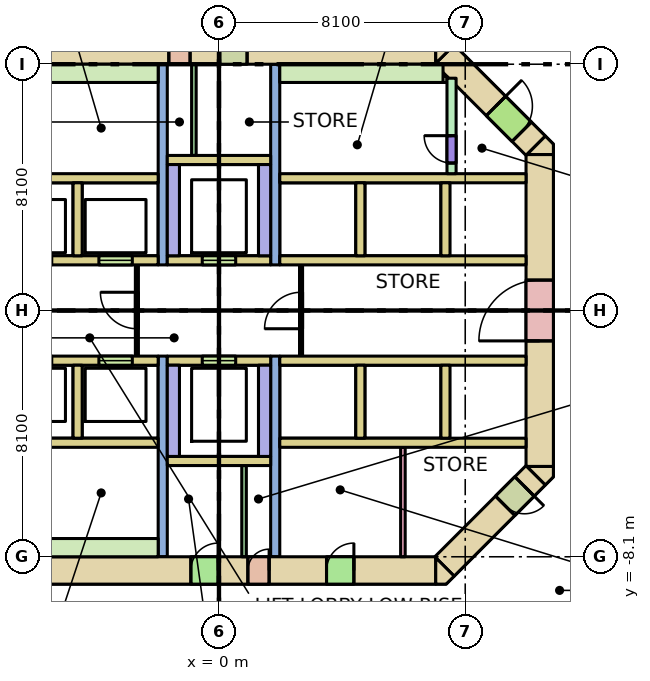
"""IFC4 building model, lengths in metres.
Left out: names, types, materials, properties, quantities, classifications, styles, units other than length and angle.
Written with IfcOpenShell. Run it as: python <this file> out.ifc"""

import sys

from ifc_helpers import new_model, si_unit, direction, frame, frame_2d, origin, place, context, subcontext, project, spatial, polyline, rectangle, outline, extrude, element, fill, save


model = new_model("IFC4")
c1 = context("Model", 3, precision=1e-05, world=origin(), true_north=direction((0.0, 1.0)))
c2 = subcontext(c1, "Body", "Model", "MODEL_VIEW")
j1 = project(units=[si_unit("LENGTHUNIT", "METRE"), si_unit("PLANEANGLEUNIT", "RADIAN")], contexts=[c1])
p1 = place(None, origin())
s1 = spatial("IfcSite", under=j1, at=p1, CompositionType="ELEMENT")
p2 = place(p1, origin())
s2 = spatial("IfcBuilding", under=s1, at=p2, CompositionType="ELEMENT")
p3 = place(p2, frame((0.0, 0.0, -7.2)))
s3 = spatial("IfcBuildingStorey", under=s2, at=p3, CompositionType="ELEMENT", Elevation=-7.2)
p4 = place(p3, frame((-7.13, 8.55, -0.32), z_axis=(0.0, 0.0, 1.0), x_axis=(1.0, 0.0, 0.0)))
e1 = element("IfcWall", 1, at=p4, inside=s3, PredefinedType="SHEAR", context=c2, shape_type="SweptSolid", body=[
    extrude(rectangle(XDim=14.26, YDim=0.9, at=frame_2d((7.13, 0.0))), origin(), (0.0, 0.0, 1.0), 3.6),
])
p5 = place(p4, frame((5.48, 0.0, 0.32)))
e2 = element("IfcOpeningElement", 2, at=p5, cuts=e1, PredefinedType="OPENING", context=c2, shape_type="SweptSolid", body=[
    extrude(rectangle(XDim=0.7, YDim=2.1, at=frame_2d((0.35, 1.05))), frame((0.0, 0.46, 0.0), z_axis=(0.0, -1.0, 0.0), x_axis=(1.0, 0.0, 0.0)), (0.0, 0.0, 1.0), 0.92),
])
p6 = place(p4, frame((7.155, 0.0, 0.32)))
e3 = element("IfcOpeningElement", 3, at=p6, cuts=e1, PredefinedType="OPENING", context=c2, shape_type="SweptSolid", body=[
    extrude(rectangle(XDim=0.9, YDim=2.1, at=frame_2d((0.45, 1.05))), frame((0.0, 0.46, 0.0), z_axis=(0.0, -1.0, 0.0), x_axis=(1.0, 0.0, 0.0)), (0.0, 0.0, 1.0), 0.92),
])
p7 = place(p3, frame((-7.13, -8.55, -0.32), z_axis=(0.0, 0.0, 1.0), x_axis=(1.0, 0.0, 0.0)))
e4 = element("IfcWall", 4, at=p7, inside=s3, PredefinedType="SHEAR", context=c2, shape_type="SweptSolid", body=[
    extrude(rectangle(XDim=14.26, YDim=0.9, at=frame_2d((7.13, 0.0))), origin(), (0.0, 0.0, 1.0), 3.6),
])
p8 = place(p7, frame((8.08, 0.0, 0.32)))
e5 = element("IfcOpeningElement", 5, at=p8, cuts=e4, PredefinedType="OPENING", context=c2, shape_type="SweptSolid", body=[
    extrude(rectangle(XDim=0.7, YDim=2.1, at=frame_2d((0.35, 1.05))), frame((0.0, 0.46, 0.0), z_axis=(0.0, -1.0, 0.0), x_axis=(1.0, 0.0, 0.0)), (0.0, 0.0, 1.0), 0.92),
])
p9 = place(p7, frame((6.205, 0.0, 0.32)))
e6 = element("IfcOpeningElement", 6, at=p9, cuts=e4, PredefinedType="OPENING", context=c2, shape_type="SweptSolid", body=[
    extrude(rectangle(XDim=0.9, YDim=2.1, at=frame_2d((0.45, 1.05))), frame((0.0, 0.46, 0.0), z_axis=(0.0, -1.0, 0.0), x_axis=(1.0, 0.0, 0.0)), (0.0, 0.0, 1.0), 0.92),
])
p10 = place(p7, frame((10.667, 0.0, 0.32)))
e7 = element("IfcOpeningElement", 7, at=p10, cuts=e4, PredefinedType="OPENING", context=c2, shape_type="SweptSolid", body=[
    extrude(rectangle(XDim=0.9, YDim=2.1, at=frame_2d((0.45, 1.05))), frame((0.0, 0.46, 0.0), z_axis=(0.0, -1.0, 0.0), x_axis=(1.0, 0.0, 0.0)), (0.0, 0.0, 1.0), 0.92),
])
p11 = place(p3, frame((10.55, -5.13, -0.32), z_axis=(0.0, 0.0, 1.0), x_axis=(0.0, 1.0, 0.0)))
e8 = element("IfcWall", 8, at=p11, inside=s3, PredefinedType="SHEAR", context=c2, shape_type="SweptSolid", body=[
    extrude(rectangle(XDim=10.26, YDim=0.9, at=frame_2d((5.13, 0.0))), origin(), (0.0, 0.0, 1.0), 3.6),
])
p12 = place(p11, frame((4.13, 0.0, 0.32)))
e9 = element("IfcOpeningElement", 9, at=p12, cuts=e8, PredefinedType="OPENING", context=c2, shape_type="SweptSolid", body=[
    extrude(rectangle(XDim=2.0, YDim=2.1, at=frame_2d((1.0, 1.05))), frame((0.0, 0.46, 0.0), z_axis=(0.0, -1.0, 0.0), x_axis=(1.0, 0.0, 0.0)), (0.0, 0.0, 1.0), 0.92),
])
p13 = place(p3, frame((7.418, 8.418, -0.32), z_axis=(0.0, 0.0, 1.0), x_axis=(0.707106781187, -0.707106781187, 0.0)))
e10 = element("IfcWall", 10, at=p13, inside=s3, PredefinedType="SHEAR", context=c2, shape_type="SweptSolid", body=[
    extrude(rectangle(XDim=4.243, YDim=0.9, at=frame_2d((2.121, 0.0))), origin(), (0.0, 0.0, 1.0), 3.6),
])
p14 = place(p13, frame((2.393, 0.0, 0.32)))
e11 = element("IfcOpeningElement", 11, at=p14, cuts=e10, PredefinedType="OPENING", context=c2, shape_type="SweptSolid", body=[
    extrude(rectangle(XDim=1.2, YDim=2.1, at=frame_2d((0.6, 1.05))), frame((0.0, 0.46, 0.0), z_axis=(0.0, -1.0, 0.0), x_axis=(1.0, 0.0, 0.0)), (0.0, 0.0, 1.0), 0.92),
])
p15 = place(p3, frame((10.418, -5.418, -0.32), z_axis=(0.0, 0.0, 1.0), x_axis=(-0.707106781187, -0.707106781187, 0.0)))
e12 = element("IfcWall", 12, at=p15, inside=s3, PredefinedType="SHEAR", context=c2, shape_type="SweptSolid", body=[
    extrude(rectangle(XDim=4.243, YDim=0.9, at=frame_2d((2.121, 0.0))), origin(), (0.0, 0.0, 1.0), 3.6),
])
p16 = place(p15, frame((0.52, 0.0, 0.32)))
e13 = element("IfcOpeningElement", 13, at=p16, cuts=e12, PredefinedType="OPENING", context=c2, shape_type="SweptSolid", body=[
    extrude(rectangle(XDim=0.9, YDim=2.1, at=frame_2d((0.45, 1.05))), frame((0.0, 0.46, 0.0), z_axis=(0.0, -1.0, 0.0), x_axis=(1.0, 0.0, 0.0)), (0.0, 0.0, 1.0), 0.92),
])
p17 = place(p3, frame((0.0, 0.0, -0.32)))
e14 = element("IfcWall", 14, at=p17, inside=s3, PredefinedType="SHEAR", context=c2, shape_type="SweptSolid", body=[
    extrude(outline(polyline([(7.473, -9.0), (7.13, -9.0), (7.13, -8.13), (7.736, -8.736), (7.473, -9.0)])), origin(), (0.0, 0.0, 1.0), 3.6),
])
p18 = place(p3, frame((0.0, 0.0, -0.32)))
e15 = element("IfcWall", 15, at=p18, inside=s3, PredefinedType="SHEAR", context=c2, shape_type="SweptSolid", body=[
    extrude(outline(polyline([(11.0, -5.473), (10.736, -5.736), (10.13, -5.13), (11.0, -5.13), (11.0, -5.473)])), origin(), (0.0, 0.0, 1.0), 3.6),
])
p19 = place(p3, frame((0.0, 0.0, -0.32)))
e16 = element("IfcWall", 16, at=p19, inside=s3, PredefinedType="SHEAR", context=c2, shape_type="SweptSolid", body=[
    extrude(outline(polyline([(11.0, 5.473), (11.0, 5.13), (10.13, 5.13), (10.736, 5.736), (11.0, 5.473)])), origin(), (0.0, 0.0, 1.0), 3.6),
])
p20 = place(p3, frame((0.0, 0.0, -0.32)))
e17 = element("IfcWall", 17, at=p20, inside=s3, PredefinedType="SHEAR", context=c2, shape_type="SweptSolid", body=[
    extrude(outline(polyline([(7.473, 9.0), (7.736, 8.736), (7.13, 8.13), (7.13, 9.0), (7.473, 9.0)])), origin(), (0.0, 0.0, 1.0), 3.6),
])
for number, where, z_axis, x_axis in (
    (18, (-10.1, 4.35, 0.0), (0.0, 0.0, 1.0), (1.0, 0.0, 0.0)),
    (19, (-10.1, -4.35, 0.0), (0.0, 0.0, 1.0), (1.0, 0.0, 0.0)),
    (20, (2.0, 4.35, 0.0), (0.0, 0.0, 1.0), (1.0, 0.0, 0.0)),
    (21, (2.0, -4.35, 0.0), (0.0, 0.0, 1.0), (1.0, 0.0, 0.0)),
):
    element("IfcWall", number, at=place(p3, frame(where, z_axis=z_axis, x_axis=x_axis)), inside=s3, PredefinedType="SOLIDWALL", context=c2, shape_type="SweptSolid", body=[
        extrude(rectangle(XDim=8.1, YDim=0.3, at=frame_2d((4.05, 0.0))), origin(), (0.0, 0.0, 1.0), 3.28),
    ])
p21 = place(p3, frame((-10.1, 1.65, 0.0), z_axis=(0.0, 0.0, 1.0), x_axis=(1.0, 0.0, 0.0)))
e22 = element("IfcWall", 22, at=p21, inside=s3, PredefinedType="SOLIDWALL", context=c2, shape_type="SweptSolid", body=[
    extrude(rectangle(XDim=8.1, YDim=0.3, at=frame_2d((4.05, 0.0))), origin(), (0.0, 0.0, 1.0), 3.28),
])
p22 = place(p21, frame((0.7, 0.0, 0.0)))
e23 = element("IfcOpeningElement", 23, at=p22, cuts=e22, PredefinedType="OPENING", context=c2, shape_type="SweptSolid", body=[
    extrude(rectangle(XDim=1.1, YDim=2.1, at=frame_2d((0.55, 1.05))), frame((0.0, 0.16, 0.0), z_axis=(0.0, -1.0, 0.0), x_axis=(1.0, 0.0, 0.0)), (0.0, 0.0, 1.0), 0.32),
])
p23 = place(p21, frame((3.5, 0.0, 0.0)))
e24 = element("IfcOpeningElement", 24, at=p23, cuts=e22, PredefinedType="OPENING", context=c2, shape_type="SweptSolid", body=[
    extrude(rectangle(XDim=1.1, YDim=2.1, at=frame_2d((0.55, 1.05))), frame((0.0, 0.16, 0.0), z_axis=(0.0, -1.0, 0.0), x_axis=(1.0, 0.0, 0.0)), (0.0, 0.0, 1.0), 0.32),
])
p24 = place(p21, frame((6.15, 0.0, 0.0)))
e25 = element("IfcOpeningElement", 25, at=p24, cuts=e22, PredefinedType="OPENING", context=c2, shape_type="SweptSolid", body=[
    extrude(rectangle(XDim=1.1, YDim=2.1, at=frame_2d((0.55, 1.05))), frame((0.0, 0.16, 0.0), z_axis=(0.0, -1.0, 0.0), x_axis=(1.0, 0.0, 0.0)), (0.0, 0.0, 1.0), 0.32),
])
p25 = place(p3, frame((-10.1, -1.65, 0.0), z_axis=(0.0, 0.0, 1.0), x_axis=(1.0, 0.0, 0.0)))
e26 = element("IfcWall", 26, at=p25, inside=s3, PredefinedType="SOLIDWALL", context=c2, shape_type="SweptSolid", body=[
    extrude(rectangle(XDim=8.1, YDim=0.3, at=frame_2d((4.05, 0.0))), origin(), (0.0, 0.0, 1.0), 3.28),
])
p26 = place(p25, frame((0.7, 0.0, 0.0)))
e27 = element("IfcOpeningElement", 27, at=p26, cuts=e26, PredefinedType="OPENING", context=c2, shape_type="SweptSolid", body=[
    extrude(rectangle(XDim=1.1, YDim=2.1, at=frame_2d((0.55, 1.05))), frame((0.0, 0.16, 0.0), z_axis=(0.0, -1.0, 0.0), x_axis=(1.0, 0.0, 0.0)), (0.0, 0.0, 1.0), 0.32),
])
p27 = place(p25, frame((3.5, 0.0, 0.0)))
e28 = element("IfcOpeningElement", 28, at=p27, cuts=e26, PredefinedType="OPENING", context=c2, shape_type="SweptSolid", body=[
    extrude(rectangle(XDim=1.1, YDim=2.1, at=frame_2d((0.55, 1.05))), frame((0.0, 0.16, 0.0), z_axis=(0.0, -1.0, 0.0), x_axis=(1.0, 0.0, 0.0)), (0.0, 0.0, 1.0), 0.32),
])
p28 = place(p25, frame((6.15, 0.0, 0.0)))
e29 = element("IfcOpeningElement", 29, at=p28, cuts=e26, PredefinedType="OPENING", context=c2, shape_type="SweptSolid", body=[
    extrude(rectangle(XDim=1.1, YDim=2.1, at=frame_2d((0.55, 1.05))), frame((0.0, 0.16, 0.0), z_axis=(0.0, -1.0, 0.0), x_axis=(1.0, 0.0, 0.0)), (0.0, 0.0, 1.0), 0.32),
])
for number, where, z_axis, x_axis in (
    (30, (2.0, 1.65, 0.0), (0.0, 0.0, 1.0), (1.0, 0.0, 0.0)),
    (31, (2.0, -1.65, 0.0), (0.0, 0.0, 1.0), (1.0, 0.0, 0.0)),
):
    element("IfcWall", number, at=place(p3, frame(where, z_axis=z_axis, x_axis=x_axis)), inside=s3, PredefinedType="SOLIDWALL", context=c2, shape_type="SweptSolid", body=[
        extrude(rectangle(XDim=8.1, YDim=0.3, at=frame_2d((4.05, 0.0))), origin(), (0.0, 0.0, 1.0), 3.28),
    ])
for number, where, z_axis, x_axis in (
    (32, (-4.65, 1.8, 0.0), (0.0, 0.0, 1.0), (0.0, 1.0, 0.0)),
    (33, (-4.65, -4.2, 0.0), (0.0, 0.0, 1.0), (0.0, 1.0, 0.0)),
    (34, (4.65, 1.8, 0.0), (0.0, 0.0, 1.0), (0.0, 1.0, 0.0)),
    (35, (4.65, -4.2, 0.0), (0.0, 0.0, 1.0), (0.0, 1.0, 0.0)),
    (36, (7.45, 1.8, 0.0), (0.0, 0.0, 1.0), (0.0, 1.0, 0.0)),
    (37, (7.45, -4.2, 0.0), (0.0, 0.0, 1.0), (0.0, 1.0, 0.0)),
):
    element("IfcWall", number, at=place(p3, frame(where, z_axis=z_axis, x_axis=x_axis)), inside=s3, PredefinedType="SOLIDWALL", context=c2, shape_type="SweptSolid", body=[
        extrude(rectangle(XDim=2.4, YDim=0.3, at=frame_2d((1.2, 0.0))), origin(), (0.0, 0.0, 1.0), 3.28),
    ])
for number, where, z_axis, x_axis in (
    (38, (-1.85, 1.5, 0.0), (0.0, 0.0, 1.0), (0.0, 1.0, 0.0)),
    (39, (-1.85, -8.1, 0.0), (0.0, 0.0, 1.0), (0.0, 1.0, 0.0)),
    (40, (1.85, 1.5, 0.0), (0.0, 0.0, 1.0), (0.0, 1.0, 0.0)),
    (41, (1.85, -8.1, 0.0), (0.0, 0.0, 1.0), (0.0, 1.0, 0.0)),
):
    element("IfcWall", number, at=place(p3, frame(where, z_axis=z_axis, x_axis=x_axis)), inside=s3, PredefinedType="SHEAR", context=c2, shape_type="SweptSolid", body=[
        extrude(rectangle(XDim=6.6, YDim=0.3, at=frame_2d((3.3, 0.0))), origin(), (0.0, 0.0, 1.0), 3.28),
    ])
p29 = place(p3, frame((-1.7, 1.65, 0.0), z_axis=(0.0, 0.0, 1.0), x_axis=(1.0, 0.0, 0.0)))
e42 = element("IfcWall", 42, at=p29, inside=s3, PredefinedType="SOLIDWALL", context=c2, shape_type="SweptSolid", body=[
    extrude(rectangle(XDim=3.4, YDim=0.3, at=frame_2d((1.7, 0.0))), origin(), (0.0, 0.0, 1.0), 3.28),
])
p30 = place(p29, frame((1.15, 0.0, 0.0)))
e43 = element("IfcOpeningElement", 43, at=p30, cuts=e42, PredefinedType="OPENING", context=c2, shape_type="SweptSolid", body=[
    extrude(rectangle(XDim=1.1, YDim=2.1, at=frame_2d((0.55, 1.05))), frame((0.0, 0.16, 0.0), z_axis=(0.0, -1.0, 0.0), x_axis=(1.0, 0.0, 0.0)), (0.0, 0.0, 1.0), 0.32),
])
p31 = place(p3, frame((-1.7, -1.65, 0.0), z_axis=(0.0, 0.0, 1.0), x_axis=(1.0, 0.0, 0.0)))
e44 = element("IfcWall", 44, at=p31, inside=s3, PredefinedType="SOLIDWALL", context=c2, shape_type="SweptSolid", body=[
    extrude(rectangle(XDim=3.4, YDim=0.3, at=frame_2d((1.7, 0.0))), origin(), (0.0, 0.0, 1.0), 3.28),
])
p32 = place(p31, frame((1.15, 0.0, 0.0)))
e45 = element("IfcOpeningElement", 45, at=p32, cuts=e44, PredefinedType="OPENING", context=c2, shape_type="SweptSolid", body=[
    extrude(rectangle(XDim=1.1, YDim=2.1, at=frame_2d((0.55, 1.05))), frame((0.0, 0.16, 0.0), z_axis=(0.0, -1.0, 0.0), x_axis=(1.0, 0.0, 0.0)), (0.0, 0.0, 1.0), 0.32),
])
for number, where, z_axis, x_axis in (
    (46, (-1.5, 1.8, 0.0), (0.0, 0.0, 1.0), (0.0, 1.0, 0.0)),
    (47, (-1.5, -4.8, 0.0), (0.0, 0.0, 1.0), (0.0, 1.0, 0.0)),
    (48, (1.5, 1.8, 0.0), (0.0, 0.0, 1.0), (0.0, 1.0, 0.0)),
    (49, (1.5, -4.8, 0.0), (0.0, 0.0, 1.0), (0.0, 1.0, 0.0)),
):
    element("IfcWall", number, at=place(p3, frame(where, z_axis=z_axis, x_axis=x_axis)), inside=s3, PredefinedType="SOLIDWALL", context=c2, shape_type="SweptSolid", body=[
        extrude(rectangle(XDim=3.0, YDim=0.4, at=frame_2d((1.5, 0.0))), origin(), (0.0, 0.0, 1.0), 3.28),
    ])
for number, where, z_axis, x_axis in (
    (50, (-1.7, 4.95, 0.0), (0.0, 0.0, 1.0), (1.0, 0.0, 0.0)),
    (51, (-1.7, -4.95, 0.0), (0.0, 0.0, 1.0), (1.0, 0.0, 0.0)),
):
    element("IfcWall", number, at=place(p3, frame(where, z_axis=z_axis, x_axis=x_axis)), inside=s3, PredefinedType="SOLIDWALL", context=c2, shape_type="SweptSolid", body=[
        extrude(rectangle(XDim=3.4, YDim=0.3, at=frame_2d((1.7, 0.0))), origin(), (0.0, 0.0, 1.0), 3.28),
    ])
p33 = place(p3, frame((-7.37, 7.8, 0.0), z_axis=(0.0, 0.0, 1.0), x_axis=(1.0, 0.0, 0.0)))
e52 = element("IfcWall", 52, at=p33, inside=s3, PredefinedType="SHEAR", context=c2, shape_type="SweptSolid", body=[
    extrude(rectangle(XDim=5.37, YDim=0.6, at=frame_2d((2.685, 0.0))), origin(), (0.0, 0.0, 1.0), 3.28),
])
p34 = place(p3, frame((7.65, 4.5, 0.0), z_axis=(0.0, 0.0, 1.0), x_axis=(0.0, 1.0, 0.0)))
e53 = element("IfcWall", 53, at=p34, inside=s3, PredefinedType="SHEAR", context=c2, shape_type="SweptSolid", body=[
    extrude(rectangle(XDim=3.14, YDim=0.3, at=frame_2d((1.57, 0.0))), origin(), (0.0, 0.0, 1.0), 3.28),
])
p35 = place(p34, frame((0.35, 0.0, 0.0)))
e54 = element("IfcOpeningElement", 54, at=p35, cuts=e53, PredefinedType="OPENING", context=c2, shape_type="SweptSolid", body=[
    extrude(rectangle(XDim=0.9, YDim=2.1, at=frame_2d((0.45, 1.05))), frame((0.0, 0.16, 0.0), z_axis=(0.0, -1.0, 0.0), x_axis=(1.0, 0.0, 0.0)), (0.0, 0.0, 1.0), 0.32),
])
p36 = place(p3, frame((2.0, 7.8, 0.0), z_axis=(0.0, 0.0, 1.0), x_axis=(1.0, 0.0, 0.0)))
e55 = element("IfcWall", 55, at=p36, inside=s3, PredefinedType="SHEAR", context=c2, shape_type="SweptSolid", body=[
    extrude(rectangle(XDim=5.37, YDim=0.6, at=frame_2d((2.685, 0.0))), origin(), (0.0, 0.0, 1.0), 3.28),
])
p37 = place(p3, frame((6.9, 7.6, 0.0), z_axis=(0.0, 0.0, 1.0), x_axis=(1.0, 0.0, 0.0)))
e56 = element("IfcWall", 56, at=p37, inside=s3, PredefinedType="SHEAR", context=c2, shape_type="SweptSolid", body=[
    extrude(rectangle(XDim=0.6, YDim=0.2, at=frame_2d((0.3, 0.0))), origin(), (0.0, 0.0, 1.0), 3.28),
])
p38 = place(p3, frame((-7.37, -7.8, 0.0), z_axis=(0.0, 0.0, 1.0), x_axis=(1.0, 0.0, 0.0)))
e57 = element("IfcWall", 57, at=p38, inside=s3, PredefinedType="SHEAR", context=c2, shape_type="SweptSolid", body=[
    extrude(rectangle(XDim=5.37, YDim=0.6, at=frame_2d((2.685, 0.0))), origin(), (0.0, 0.0, 1.0), 3.28),
])
p39 = place(p3, frame((-2.7, -1.5, 0.0), z_axis=(0.0, 0.0, 1.0), x_axis=(0.0, 1.0, 0.0)))
e58 = element("IfcWall", 58, at=p39, inside=s3, PredefinedType="PARTITIONING", context=c2, shape_type="SweptSolid", body=[
    extrude(rectangle(XDim=3.0, YDim=0.1, at=frame_2d((1.5, 0.0))), origin(), (0.0, 0.0, 1.0), 3.28),
])
p40 = place(p39, frame((0.9, 0.0, 0.0)))
e59 = element("IfcOpeningElement", 59, at=p40, cuts=e58, PredefinedType="OPENING", context=c2, shape_type="SweptSolid", body=[
    extrude(rectangle(XDim=1.2, YDim=2.1, at=frame_2d((0.6, 1.05))), frame((0.0, 0.06, 0.0), z_axis=(0.0, -1.0, 0.0), x_axis=(1.0, 0.0, 0.0)), (0.0, 0.0, 1.0), 0.12),
])
p41 = place(p3, frame((2.7, -1.5, 0.0), z_axis=(0.0, 0.0, 1.0), x_axis=(0.0, 1.0, 0.0)))
e60 = element("IfcWall", 60, at=p41, inside=s3, PredefinedType="PARTITIONING", context=c2, shape_type="SweptSolid", body=[
    extrude(rectangle(XDim=3.0, YDim=0.1, at=frame_2d((1.5, 0.0))), origin(), (0.0, 0.0, 1.0), 3.28),
])
p42 = place(p41, frame((0.9, 0.0, 0.0)))
e61 = element("IfcOpeningElement", 61, at=p42, cuts=e60, PredefinedType="OPENING", context=c2, shape_type="SweptSolid", body=[
    extrude(rectangle(XDim=1.2, YDim=2.1, at=frame_2d((0.6, 1.05))), frame((0.0, 0.06, 0.0), z_axis=(0.0, -1.0, 0.0), x_axis=(1.0, 0.0, 0.0)), (0.0, 0.0, 1.0), 0.12),
])
for number, where, z_axis, x_axis in (
    (62, (-0.825, 5.1, 0.0), (0.0, 0.0, 1.0), (0.0, 1.0, 0.0)),
    (63, (0.825, -8.1, 0.0), (0.0, 0.0, 1.0), (0.0, 1.0, 0.0)),
):
    element("IfcWall", number, at=place(p3, frame(where, z_axis=z_axis, x_axis=x_axis)), inside=s3, PredefinedType="PARTITIONING", context=c2, shape_type="SweptSolid", body=[
        extrude(rectangle(XDim=3.0, YDim=0.15, at=frame_2d((1.5, 0.0))), origin(), (0.0, 0.0, 1.0), 3.28),
    ])
p43 = place(p3, frame((6.05, -8.1, 0.0), z_axis=(0.0, 0.0, 1.0), x_axis=(0.0, 1.0, 0.0)))
e64 = element("IfcWall", 64, at=p43, inside=s3, PredefinedType="PARTITIONING", context=c2, shape_type="SweptSolid", body=[
    extrude(rectangle(XDim=3.6, YDim=0.15, at=frame_2d((1.8, 0.0))), origin(), (0.0, 0.0, 1.0), 3.28),
])
p44 = place(p24, origin())
e65 = element("IfcDoor", 65, at=p44, inside=s3, OperationType="DOUBLE_DOOR_SLIDING", PredefinedType="DOOR", context=c2, shape_type="SweptSolid", body=[
    extrude(rectangle(XDim=1.1, YDim=2.1, at=frame_2d((0.55, 1.05))), frame((0.0, 0.025, 0.0), z_axis=(0.0, -1.0, 0.0), x_axis=(1.0, 0.0, 0.0)), (0.0, 0.0, 1.0), 0.05),
])
fill(e25, e65)
p45 = place(p28, origin())
e66 = element("IfcDoor", 66, at=p45, inside=s3, OperationType="DOUBLE_DOOR_SLIDING", PredefinedType="DOOR", context=c2, shape_type="SweptSolid", body=[
    extrude(rectangle(XDim=1.1, YDim=2.1, at=frame_2d((0.55, 1.05))), frame((0.0, 0.025, 0.0), z_axis=(0.0, -1.0, 0.0), x_axis=(1.0, 0.0, 0.0)), (0.0, 0.0, 1.0), 0.05),
])
fill(e29, e66)
p46 = place(p30, origin())
e67 = element("IfcDoor", 67, at=p46, inside=s3, OperationType="DOUBLE_DOOR_SLIDING", PredefinedType="DOOR", context=c2, shape_type="SweptSolid", body=[
    extrude(rectangle(XDim=1.1, YDim=2.1, at=frame_2d((0.55, 1.05))), frame((0.0, 0.025, 0.0), z_axis=(0.0, -1.0, 0.0), x_axis=(1.0, 0.0, 0.0)), (0.0, 0.0, 1.0), 0.05),
])
fill(e43, e67)
p47 = place(p32, origin())
e68 = element("IfcDoor", 68, at=p47, inside=s3, OperationType="DOUBLE_DOOR_SLIDING", PredefinedType="DOOR", context=c2, shape_type="SweptSolid", body=[
    extrude(rectangle(XDim=1.1, YDim=2.1, at=frame_2d((0.55, 1.05))), frame((0.0, 0.025, 0.0), z_axis=(0.0, -1.0, 0.0), x_axis=(1.0, 0.0, 0.0)), (0.0, 0.0, 1.0), 0.05),
])
fill(e45, e68)
p48 = place(p35, origin())
e69 = element("IfcDoor", 69, at=p48, inside=s3, OperationType="SINGLE_SWING_RIGHT", PredefinedType="DOOR", context=c2, shape_type="SweptSolid", body=[
    extrude(rectangle(XDim=0.9, YDim=2.1, at=frame_2d((0.45, 1.05))), frame((0.0, 0.025, 0.0), z_axis=(0.0, -1.0, 0.0), x_axis=(1.0, 0.0, 0.0)), (0.0, 0.0, 1.0), 0.05),
])
fill(e54, e69)
p49 = place(p14, origin())
e70 = element("IfcDoor", 70, at=p49, inside=s3, OperationType="SINGLE_SWING_LEFT", PredefinedType="DOOR", context=c2, shape_type="SweptSolid", body=[
    extrude(rectangle(XDim=1.2, YDim=2.1, at=frame_2d((0.6, 1.05))), frame((0.0, 0.025, 0.0), z_axis=(0.0, -1.0, 0.0), x_axis=(1.0, 0.0, 0.0)), (0.0, 0.0, 1.0), 0.05),
])
fill(e11, e70)
p50 = place(p12, origin())
e71 = element("IfcDoor", 71, at=p50, inside=s3, OperationType="DOUBLE_DOOR_SINGLE_SWING", PredefinedType="DOOR", context=c2, shape_type="SweptSolid", body=[
    extrude(rectangle(XDim=2.0, YDim=2.1, at=frame_2d((1.0, 1.05))), frame((0.0, 0.025, 0.0), z_axis=(0.0, -1.0, 0.0), x_axis=(1.0, 0.0, 0.0)), (0.0, 0.0, 1.0), 0.05),
])
fill(e9, e71)
p51 = place(p40, origin())
e72 = element("IfcDoor", 72, at=p51, inside=s3, OperationType="SINGLE_SWING_RIGHT", PredefinedType="DOOR", context=c2, shape_type="SweptSolid", body=[
    extrude(rectangle(XDim=1.2, YDim=2.1, at=frame_2d((0.6, 1.05))), frame((0.0, 0.025, 0.0), z_axis=(0.0, -1.0, 0.0), x_axis=(1.0, 0.0, 0.0)), (0.0, 0.0, 1.0), 0.05),
])
fill(e59, e72)
p52 = place(p42, origin())
e73 = element("IfcDoor", 73, at=p52, inside=s3, OperationType="SINGLE_SWING_LEFT", PredefinedType="DOOR", context=c2, shape_type="SweptSolid", body=[
    extrude(rectangle(XDim=1.2, YDim=2.1, at=frame_2d((0.6, 1.05))), frame((0.0, 0.025, 0.0), z_axis=(0.0, -1.0, 0.0), x_axis=(1.0, 0.0, 0.0)), (0.0, 0.0, 1.0), 0.05),
])
fill(e61, e73)
p53 = place(p8, origin())
e74 = element("IfcDoor", 74, at=p53, inside=s3, OperationType="SINGLE_SWING_RIGHT", PredefinedType="DOOR", context=c2, shape_type="SweptSolid", body=[
    extrude(rectangle(XDim=0.7, YDim=2.1, at=frame_2d((0.35, 1.05))), frame((0.0, 0.025, 0.0), z_axis=(0.0, -1.0, 0.0), x_axis=(1.0, 0.0, 0.0)), (0.0, 0.0, 1.0), 0.05),
])
fill(e5, e74)
p54 = place(p9, origin())
e75 = element("IfcDoor", 75, at=p54, inside=s3, OperationType="SINGLE_SWING_RIGHT", PredefinedType="DOOR", context=c2, shape_type="SweptSolid", body=[
    extrude(rectangle(XDim=0.9, YDim=2.1, at=frame_2d((0.45, 1.05))), frame((0.0, 0.025, 0.0), z_axis=(0.0, -1.0, 0.0), x_axis=(1.0, 0.0, 0.0)), (0.0, 0.0, 1.0), 0.05),
])
fill(e6, e75)
p55 = place(p10, origin())
e76 = element("IfcDoor", 76, at=p55, inside=s3, OperationType="SINGLE_SWING_RIGHT", PredefinedType="DOOR", context=c2, shape_type="SweptSolid", body=[
    extrude(rectangle(XDim=0.9, YDim=2.1, at=frame_2d((0.45, 1.05))), frame((0.0, 0.025, 0.0), z_axis=(0.0, -1.0, 0.0), x_axis=(1.0, 0.0, 0.0)), (0.0, 0.0, 1.0), 0.05),
])
fill(e7, e76)
p56 = place(p16, origin())
e77 = element("IfcDoor", 77, at=p56, inside=s3, OperationType="SINGLE_SWING_LEFT", PredefinedType="DOOR", context=c2, shape_type="SweptSolid", body=[
    extrude(rectangle(XDim=0.9, YDim=2.1, at=frame_2d((0.45, 1.05))), frame((0.0, 0.025, 0.0), z_axis=(0.0, -1.0, 0.0), x_axis=(1.0, 0.0, 0.0)), (0.0, 0.0, 1.0), 0.05),
])
fill(e13, e77)
save(model, sys.argv[1])
